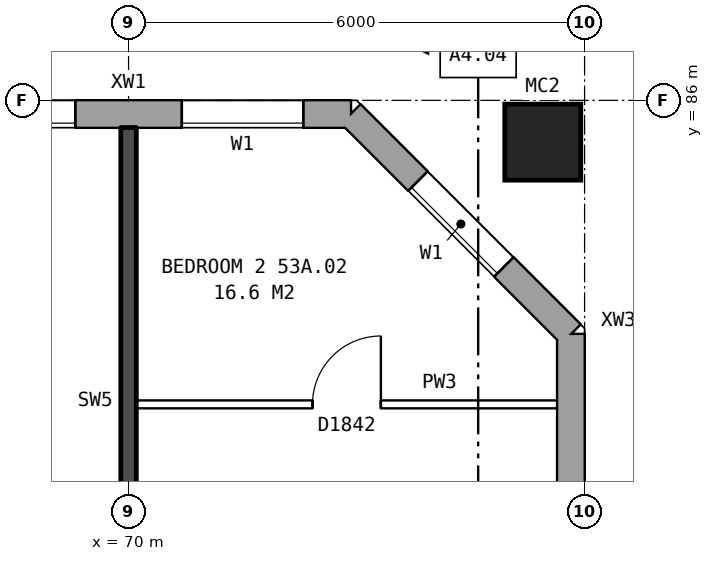
"""IFC4 building model, lengths in metres.
Left out: names, types, materials, properties, quantities, classifications, styles, units other than length and angle.
Written with IfcOpenShell. Run it as: python <this file> out.ifc"""

import sys

from ifc_helpers import new_model, si_unit, direction, frame, frame_2d, origin, origin_2d, place, context, subcontext, project, spatial, rectangle, hollow_rectangle, extrude, element, fill, save


model = new_model("IFC4")
c1 = context("Model", 3, precision=1e-05, world=origin(), true_north=direction((0.0, 1.0)))
c2 = subcontext(c1, "Body", "Model", "MODEL_VIEW")
j1 = project(units=[si_unit("LENGTHUNIT", "METRE"), si_unit("PLANEANGLEUNIT", "RADIAN")], contexts=[c1])
p1 = place(None, origin())
s1 = spatial("IfcSite", under=j1, at=p1, CompositionType="ELEMENT")
p2 = place(p1, origin())
s2 = spatial("IfcBuilding", under=s1, at=p2, CompositionType="ELEMENT")
p3 = place(p2, frame((0.0, 0.0, 188.2)))
s3 = spatial("IfcBuildingStorey", under=s2, at=p3, CompositionType="ELEMENT", Elevation=188.2)
p4 = place(p3, frame((75.45, 85.45, 0.0), z_axis=(0.0, 0.0, 1.0), x_axis=(1.0, 0.0, 0.0)))
e1 = element("IfcColumn", 1, at=p4, inside=s3, PredefinedType="COLUMN", context=c2, shape_type="SweptSolid", body=[
    extrude(hollow_rectangle(XDim=1.0, YDim=1.0, WallThickness=0.055, at=origin_2d()), origin(), (0.0, 0.0, 1.0), 3.1),
])
p5 = place(p3, frame((75.82, 57.075, 0.0), z_axis=(0.0, 0.0, 1.0), x_axis=(0.0, 1.0, 0.0)))
e2 = element("IfcWall", 2, at=p5, inside=s3, PredefinedType="STANDARD", context=c2, shape_type="SweptSolid", body=[
    extrude(rectangle(XDim=25.851, YDim=0.36, at=frame_2d((12.925, 0.0))), origin(), (0.0, 0.0, 1.0), 2.85),
])
p6 = place(p5, frame((1.975, 0.0, 1.7)))
e3 = element("IfcOpeningElement", 3, at=p6, cuts=e2, PredefinedType="OPENING", context=c2, shape_type="SweptSolid", body=[
    extrude(rectangle(XDim=1.0, YDim=0.9, at=frame_2d((0.5, 0.45))), frame((0.0, 0.19, 0.0), z_axis=(0.0, -1.0, 0.0), x_axis=(1.0, 0.0, 0.0)), (0.0, 0.0, 1.0), 0.38),
])
p7 = place(p5, frame((4.625, 0.0, 0.8)))
e4 = element("IfcOpeningElement", 4, at=p7, cuts=e2, PredefinedType="OPENING", context=c2, shape_type="SweptSolid", body=[
    extrude(rectangle(XDim=1.6, YDim=1.8, at=frame_2d((0.8, 0.9))), frame((0.0, 0.19, 0.0), z_axis=(0.0, -1.0, 0.0), x_axis=(1.0, 0.0, 0.0)), (0.0, 0.0, 1.0), 0.38),
])
p8 = place(p5, frame((19.625, 0.0, 0.8)))
e5 = element("IfcOpeningElement", 5, at=p8, cuts=e2, PredefinedType="OPENING", context=c2, shape_type="SweptSolid", body=[
    extrude(rectangle(XDim=1.6, YDim=1.8, at=frame_2d((0.8, 0.9))), frame((0.0, 0.19, 0.0), z_axis=(0.0, -1.0, 0.0), x_axis=(1.0, 0.0, 0.0)), (0.0, 0.0, 1.0), 0.38),
])
p9 = place(p5, frame((21.55, 0.0, 1.1)))
e6 = element("IfcOpeningElement", 6, at=p9, cuts=e2, PredefinedType="OPENING", context=c2, shape_type="SweptSolid", body=[
    extrude(rectangle(XDim=1.4, YDim=1.5, at=frame_2d((0.7, 0.75))), frame((0.0, 0.19, 0.0), z_axis=(0.0, -1.0, 0.0), x_axis=(1.0, 0.0, 0.0)), (0.0, 0.0, 1.0), 0.38),
])
p10 = place(p5, frame((3.325, 0.0, 0.8)))
e7 = element("IfcOpeningElement", 7, at=p10, cuts=e2, PredefinedType="OPENING", context=c2, shape_type="SweptSolid", body=[
    extrude(rectangle(XDim=1.0, YDim=1.8, at=frame_2d((0.5, 0.9))), frame((0.0, 0.19, 0.0), z_axis=(0.0, -1.0, 0.0), x_axis=(1.0, 0.0, 0.0)), (0.0, 0.0, 1.0), 0.38),
])
p11 = place(p5, frame((23.25, 0.0, 1.7)))
e8 = element("IfcOpeningElement", 8, at=p11, cuts=e2, PredefinedType="OPENING", context=c2, shape_type="SweptSolid", body=[
    extrude(rectangle(XDim=0.6, YDim=0.9, at=frame_2d((0.3, 0.45))), frame((0.0, 0.19, 0.0), z_axis=(0.0, -1.0, 0.0), x_axis=(1.0, 0.0, 0.0)), (0.0, 0.0, 1.0), 0.38),
])
p12 = place(p3, frame((75.82, 82.925, 0.0), z_axis=(0.0, 0.0, 1.0), x_axis=(-0.707106781187, 0.707106781187, 0.0)))
e9 = element("IfcWall", 9, at=p12, inside=s3, PredefinedType="STANDARD", context=c2, shape_type="SweptSolid", body=[
    extrude(rectangle(XDim=4.094, YDim=0.36, at=frame_2d((2.047, 0.0))), origin(), (0.0, 0.0, 1.0), 2.85),
])
p13 = place(p12, frame((1.247, 0.0, 0.8)))
e10 = element("IfcOpeningElement", 10, at=p13, cuts=e9, PredefinedType="OPENING", context=c2, shape_type="SweptSolid", body=[
    extrude(rectangle(XDim=1.6, YDim=1.8, at=frame_2d((0.8, 0.9))), frame((0.0, 0.19, 0.0), z_axis=(0.0, -1.0, 0.0), x_axis=(1.0, 0.0, 0.0)), (0.0, 0.0, 1.0), 0.38),
])
p14 = place(p3, frame((72.925, 85.82, 0.0), z_axis=(0.0, 0.0, 1.0), x_axis=(-1.0, 0.0, 0.0)))
e11 = element("IfcWall", 11, at=p14, inside=s3, PredefinedType="STANDARD", context=c2, shape_type="SweptSolid", body=[
    extrude(rectangle(XDim=39.601, YDim=0.36, at=frame_2d((19.8, 0.0))), origin(), (0.0, 0.0, 1.0), 2.85),
])
p15 = place(p14, frame((0.625, 0.0, 0.8)))
e12 = element("IfcOpeningElement", 12, at=p15, cuts=e11, PredefinedType="OPENING", context=c2, shape_type="SweptSolid", body=[
    extrude(rectangle(XDim=1.6, YDim=1.8, at=frame_2d((0.8, 0.9))), frame((0.0, 0.19, 0.0), z_axis=(0.0, -1.0, 0.0), x_axis=(1.0, 0.0, 0.0)), (0.0, 0.0, 1.0), 0.38),
])
p16 = place(p14, frame((3.625, 0.0, 0.8)))
e13 = element("IfcOpeningElement", 13, at=p16, cuts=e11, PredefinedType="OPENING", context=c2, shape_type="SweptSolid", body=[
    extrude(rectangle(XDim=1.6, YDim=1.8, at=frame_2d((0.8, 0.9))), frame((0.0, 0.19, 0.0), z_axis=(0.0, -1.0, 0.0), x_axis=(1.0, 0.0, 0.0)), (0.0, 0.0, 1.0), 0.38),
])
p17 = place(p14, frame((6.625, 0.0, 0.8)))
e14 = element("IfcOpeningElement", 14, at=p17, cuts=e11, PredefinedType="OPENING", context=c2, shape_type="SweptSolid", body=[
    extrude(rectangle(XDim=1.6, YDim=1.8, at=frame_2d((0.8, 0.9))), frame((0.0, 0.19, 0.0), z_axis=(0.0, -1.0, 0.0), x_axis=(1.0, 0.0, 0.0)), (0.0, 0.0, 1.0), 0.38),
])
p18 = place(p14, frame((9.625, 0.0, 0.8)))
e15 = element("IfcOpeningElement", 15, at=p18, cuts=e11, PredefinedType="OPENING", context=c2, shape_type="SweptSolid", body=[
    extrude(rectangle(XDim=1.6, YDim=1.8, at=frame_2d((0.8, 0.9))), frame((0.0, 0.19, 0.0), z_axis=(0.0, -1.0, 0.0), x_axis=(1.0, 0.0, 0.0)), (0.0, 0.0, 1.0), 0.38),
])
p19 = place(p14, frame((12.625, 0.0, 0.8)))
e16 = element("IfcOpeningElement", 16, at=p19, cuts=e11, PredefinedType="OPENING", context=c2, shape_type="SweptSolid", body=[
    extrude(rectangle(XDim=1.6, YDim=1.8, at=frame_2d((0.8, 0.9))), frame((0.0, 0.19, 0.0), z_axis=(0.0, -1.0, 0.0), x_axis=(1.0, 0.0, 0.0)), (0.0, 0.0, 1.0), 0.38),
])
p20 = place(p14, frame((15.575, 0.0, 0.15)))
e17 = element("IfcOpeningElement", 17, at=p20, cuts=e11, PredefinedType="OPENING", context=c2, shape_type="SweptSolid", body=[
    extrude(rectangle(XDim=0.6, YDim=0.9, at=frame_2d((0.3, 0.45))), frame((0.0, 0.19, 0.0), z_axis=(0.0, -1.0, 0.0), x_axis=(1.0, 0.0, 0.0)), (0.0, 0.0, 1.0), 0.38),
])
p21 = place(p14, frame((18.625, 0.0, 0.8)))
e18 = element("IfcOpeningElement", 18, at=p21, cuts=e11, PredefinedType="OPENING", context=c2, shape_type="SweptSolid", body=[
    extrude(rectangle(XDim=1.6, YDim=1.8, at=frame_2d((0.8, 0.9))), frame((0.0, 0.19, 0.0), z_axis=(0.0, -1.0, 0.0), x_axis=(1.0, 0.0, 0.0)), (0.0, 0.0, 1.0), 0.38),
])
p22 = place(p14, frame((21.125, 0.0, 0.8)))
e19 = element("IfcOpeningElement", 19, at=p22, cuts=e11, PredefinedType="OPENING", context=c2, shape_type="SweptSolid", body=[
    extrude(rectangle(XDim=1.2, YDim=1.8, at=frame_2d((0.6, 0.9))), frame((0.0, 0.19, 0.0), z_axis=(0.0, -1.0, 0.0), x_axis=(1.0, 0.0, 0.0)), (0.0, 0.0, 1.0), 0.38),
])
p23 = place(p14, frame((24.525, 0.0, 1.7)))
e20 = element("IfcOpeningElement", 20, at=p23, cuts=e11, PredefinedType="OPENING", context=c2, shape_type="SweptSolid", body=[
    extrude(rectangle(XDim=0.6, YDim=0.9, at=frame_2d((0.3, 0.45))), frame((0.0, 0.19, 0.0), z_axis=(0.0, -1.0, 0.0), x_axis=(1.0, 0.0, 0.0)), (0.0, 0.0, 1.0), 0.38),
])
p24 = place(p14, frame((27.625, 0.0, 0.8)))
e21 = element("IfcOpeningElement", 21, at=p24, cuts=e11, PredefinedType="OPENING", context=c2, shape_type="SweptSolid", body=[
    extrude(rectangle(XDim=1.6, YDim=1.8, at=frame_2d((0.8, 0.9))), frame((0.0, 0.19, 0.0), z_axis=(0.0, -1.0, 0.0), x_axis=(1.0, 0.0, 0.0)), (0.0, 0.0, 1.0), 0.38),
])
p25 = place(p14, frame((30.625, 0.0, 0.8)))
e22 = element("IfcOpeningElement", 22, at=p25, cuts=e11, PredefinedType="OPENING", context=c2, shape_type="SweptSolid", body=[
    extrude(rectangle(XDim=1.6, YDim=1.8, at=frame_2d((0.8, 0.9))), frame((0.0, 0.19, 0.0), z_axis=(0.0, -1.0, 0.0), x_axis=(1.0, 0.0, 0.0)), (0.0, 0.0, 1.0), 0.38),
])
p26 = place(p14, frame((33.625, 0.0, 0.8)))
e23 = element("IfcOpeningElement", 23, at=p26, cuts=e11, PredefinedType="OPENING", context=c2, shape_type="SweptSolid", body=[
    extrude(rectangle(XDim=1.6, YDim=1.8, at=frame_2d((0.8, 0.9))), frame((0.0, 0.19, 0.0), z_axis=(0.0, -1.0, 0.0), x_axis=(1.0, 0.0, 0.0)), (0.0, 0.0, 1.0), 0.38),
])
p27 = place(p14, frame((36.625, 0.0, 0.8)))
e24 = element("IfcOpeningElement", 24, at=p27, cuts=e11, PredefinedType="OPENING", context=c2, shape_type="SweptSolid", body=[
    extrude(rectangle(XDim=1.6, YDim=1.8, at=frame_2d((0.8, 0.9))), frame((0.0, 0.19, 0.0), z_axis=(0.0, -1.0, 0.0), x_axis=(1.0, 0.0, 0.0)), (0.0, 0.0, 1.0), 0.38),
])
p28 = place(p14, frame((16.475, 0.0, 0.15)))
e25 = element("IfcOpeningElement", 25, at=p28, cuts=e11, PredefinedType="OPENING", context=c2, shape_type="SweptSolid", body=[
    extrude(rectangle(XDim=1.2, YDim=1.8, at=frame_2d((0.6, 0.9))), frame((0.0, 0.19, 0.0), z_axis=(0.0, -1.0, 0.0), x_axis=(1.0, 0.0, 0.0)), (0.0, 0.0, 1.0), 0.38),
])
p29 = place(p14, frame((22.625, 0.0, 0.8)))
e26 = element("IfcOpeningElement", 26, at=p29, cuts=e11, PredefinedType="OPENING", context=c2, shape_type="SweptSolid", body=[
    extrude(rectangle(XDim=0.6, YDim=0.9, at=frame_2d((0.3, 0.45))), frame((0.0, 0.19, 0.0), z_axis=(0.0, -1.0, 0.0), x_axis=(1.0, 0.0, 0.0)), (0.0, 0.0, 1.0), 0.38),
])
p30 = place(p14, frame((25.425, 0.0, 0.8)))
e27 = element("IfcOpeningElement", 27, at=p30, cuts=e11, PredefinedType="OPENING", context=c2, shape_type="SweptSolid", body=[
    extrude(rectangle(XDim=1.2, YDim=1.8, at=frame_2d((0.6, 0.9))), frame((0.0, 0.19, 0.0), z_axis=(0.0, -1.0, 0.0), x_axis=(1.0, 0.0, 0.0)), (0.0, 0.0, 1.0), 0.38),
])
p31 = place(p3, frame((70.1, 82.0, 0.0), z_axis=(0.0, 0.0, 1.0), x_axis=(1.0, 0.0, 0.0)))
e28 = element("IfcWall", 28, at=p31, inside=s3, PredefinedType="PARTITIONING", context=c2, shape_type="SweptSolid", body=[
    extrude(rectangle(XDim=5.54, YDim=0.1, at=frame_2d((2.77, 0.0))), origin(), (0.0, 0.0, 1.0), 2.85),
])
p32 = place(p31, frame((2.32, 0.0, 0.0)))
e29 = element("IfcOpeningElement", 29, at=p32, cuts=e28, PredefinedType="OPENING", context=c2, shape_type="SweptSolid", body=[
    extrude(rectangle(XDim=0.9, YDim=2.1, at=frame_2d((0.45, 1.05))), frame((0.0, 0.06, 0.0), z_axis=(0.0, -1.0, 0.0), x_axis=(1.0, 0.0, 0.0)), (0.0, 0.0, 1.0), 0.12),
])
p33 = place(p3, frame((70.0, 76.2, 0.0), z_axis=(0.0, 0.0, 1.0), x_axis=(0.0, 1.0, 0.0)))
e30 = element("IfcWall", 30, at=p33, inside=s3, PredefinedType="SOLIDWALL", context=c2, shape_type="SweptSolid", body=[
    extrude(rectangle(XDim=9.44, YDim=0.2, at=frame_2d((4.72, 0.0))), origin(), (0.0, 0.0, 1.0), 2.85),
])
p34 = place(p33, frame((1.35, 0.0, 0.0)))
e31 = element("IfcOpeningElement", 31, at=p34, cuts=e30, PredefinedType="OPENING", context=c2, shape_type="SweptSolid", body=[
    extrude(rectangle(XDim=0.9, YDim=2.1, at=frame_2d((0.45, 1.05))), frame((0.0, 0.11, 0.0), z_axis=(0.0, -1.0, 0.0), x_axis=(1.0, 0.0, 0.0)), (0.0, 0.0, 1.0), 0.22),
])
p35 = place(p13, origin())
e32 = element("IfcWindow", 32, at=p35, inside=s3, PartitioningType="SINGLE_PANEL", PredefinedType="WINDOW", context=c2, shape_type="SweptSolid", body=[
    extrude(rectangle(XDim=1.6, YDim=1.8, at=frame_2d((0.8, 0.9))), frame((0.0, 0.15, 0.0), z_axis=(0.0, -1.0, 0.0), x_axis=(1.0, 0.0, 0.0)), (0.0, 0.0, 1.0), 0.06),
])
fill(e10, e32)
p36 = place(p15, origin())
e33 = element("IfcWindow", 33, at=p36, inside=s3, PartitioningType="SINGLE_PANEL", PredefinedType="WINDOW", context=c2, shape_type="SweptSolid", body=[
    extrude(rectangle(XDim=1.6, YDim=1.8, at=frame_2d((0.8, 0.9))), frame((0.0, 0.15, 0.0), z_axis=(0.0, -1.0, 0.0), x_axis=(1.0, 0.0, 0.0)), (0.0, 0.0, 1.0), 0.06),
])
fill(e12, e33)
p37 = place(p16, origin())
e34 = element("IfcWindow", 34, at=p37, inside=s3, PartitioningType="SINGLE_PANEL", PredefinedType="WINDOW", context=c2, shape_type="SweptSolid", body=[
    extrude(rectangle(XDim=1.6, YDim=1.8, at=frame_2d((0.8, 0.9))), frame((0.0, 0.15, 0.0), z_axis=(0.0, -1.0, 0.0), x_axis=(1.0, 0.0, 0.0)), (0.0, 0.0, 1.0), 0.06),
])
fill(e13, e34)
p38 = place(p32, origin())
e35 = element("IfcDoor", 35, at=p38, inside=s3, OperationType="SINGLE_SWING_RIGHT", PredefinedType="DOOR", context=c2, shape_type="SweptSolid", body=[
    extrude(rectangle(XDim=0.9, YDim=2.1, at=frame_2d((0.45, 1.05))), frame((0.0, 0.025, 0.0), z_axis=(0.0, -1.0, 0.0), x_axis=(1.0, 0.0, 0.0)), (0.0, 0.0, 1.0), 0.05),
])
fill(e29, e35)
save(model, sys.argv[1])
